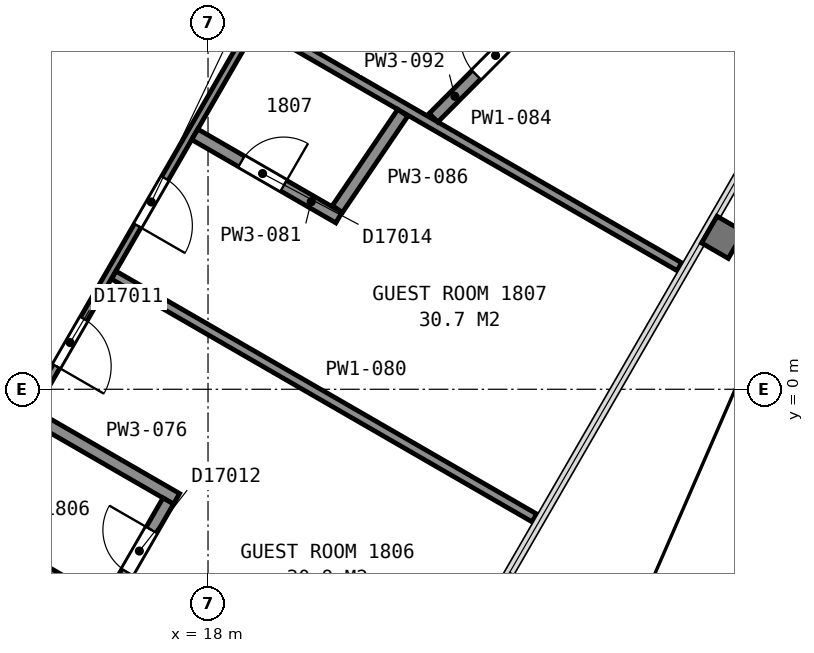
"""IFC4 building model, lengths in metres.
Left out: names, types, materials, properties, quantities, classifications, styles, units other than length and angle.
Written with IfcOpenShell. Run it as: python <this file> out.ifc"""

import sys

from ifc_helpers import new_model, si_unit, direction, frame, frame_2d, origin, place, context, subcontext, project, spatial, rectangle, extrude, element, fill, save


model = new_model("IFC4")
c1 = context("Model", 3, precision=1e-05, world=origin(), true_north=direction((0.0, 1.0)))
c2 = subcontext(c1, "Body", "Model", "MODEL_VIEW")
j1 = project(units=[si_unit("LENGTHUNIT", "METRE"), si_unit("PLANEANGLEUNIT", "RADIAN")], contexts=[c1])
p1 = place(None, origin())
s1 = spatial("IfcSite", under=j1, at=p1, CompositionType="ELEMENT")
p2 = place(p1, origin())
s2 = spatial("IfcBuilding", under=s1, at=p2, CompositionType="ELEMENT")
p3 = place(p2, frame((0.0, 0.0, 80.0)))
s3 = spatial("IfcBuildingStorey", under=s2, at=p3, CompositionType="ELEMENT", Elevation=80.0)
for number, where, z_axis, x_axis in (
    (1, (6.178, 5.299, 0.0), (0.0, 0.0, 1.0), (0.866, 0.5, 0.0)),
    (2, (7.678, 2.701, 0.0), (0.0, 0.0, 1.0), (0.866, 0.5, 0.0)),
):
    element("IfcWall", number, at=place(p3, frame(where, z_axis=z_axis, x_axis=x_axis)), inside=s3, PredefinedType="PARTITIONING", context=c2, shape_type="SweptSolid", body=[
        extrude(rectangle(XDim=12.0, YDim=0.2, at=frame_2d((6.0, 0.0))), origin(), (0.0, 0.0, 1.0), 3.35),
    ])
p4 = place(p3, frame((19.456, 7.217, 0.0), z_axis=(0.0, 0.0, 1.0), x_axis=(-0.50002170027, -0.866012874765, 0.0)))
e3 = element("IfcWall", 3, at=p4, inside=s3, PredefinedType="PARTITIONING", context=c2, shape_type="SweptSolid", body=[
    extrude(rectangle(XDim=31.379, YDim=0.125, at=frame_2d((15.69, 0.0))), origin(), (0.0, 0.0, 1.0), 2.613),
])
p5 = place(p4, frame((26.843, 0.0, 0.0)))
e4 = element("IfcOpeningElement", 4, at=p5, cuts=e3, PredefinedType="OPENING", context=c2, shape_type="SweptSolid", body=[
    extrude(rectangle(XDim=1.0, YDim=2.1, at=frame_2d((0.5, 1.05))), frame((0.0, 0.073, 0.0), z_axis=(0.0, -1.0, 0.0), x_axis=(1.0, 0.0, 0.0)), (0.0, 0.0, 1.0), 0.145),
])
p6 = place(p4, frame((24.03, 0.0, 0.0)))
e5 = element("IfcOpeningElement", 5, at=p6, cuts=e3, PredefinedType="OPENING", context=c2, shape_type="SweptSolid", body=[
    extrude(rectangle(XDim=0.9, YDim=2.1, at=frame_2d((0.45, 1.05))), frame((0.0, 0.073, 0.0), z_axis=(0.0, -1.0, 0.0), x_axis=(1.0, 0.0, 0.0)), (0.0, 0.0, 1.0), 0.145),
])
p7 = place(p4, frame((17.159, 0.0, 0.0)))
e6 = element("IfcOpeningElement", 6, at=p7, cuts=e3, PredefinedType="OPENING", context=c2, shape_type="SweptSolid", body=[
    extrude(rectangle(XDim=0.9, YDim=2.1, at=frame_2d((0.45, 1.05))), frame((0.0, 0.073, 0.0), z_axis=(0.0, -1.0, 0.0), x_axis=(1.0, 0.0, 0.0)), (0.0, 0.0, 1.0), 0.145),
])
p8 = place(p4, frame((14.24, 0.0, 0.0)))
e7 = element("IfcOpeningElement", 7, at=p8, cuts=e3, PredefinedType="OPENING", context=c2, shape_type="SweptSolid", body=[
    extrude(rectangle(XDim=0.9, YDim=2.1, at=frame_2d((0.45, 1.05))), frame((0.0, 0.073, 0.0), z_axis=(0.0, -1.0, 0.0), x_axis=(1.0, 0.0, 0.0)), (0.0, 0.0, 1.0), 0.145),
])
p9 = place(p4, frame((6.997, 0.0, 0.0)))
e8 = element("IfcOpeningElement", 8, at=p9, cuts=e3, PredefinedType="OPENING", context=c2, shape_type="SweptSolid", body=[
    extrude(rectangle(XDim=0.9, YDim=2.1, at=frame_2d((0.45, 1.05))), frame((0.0, 0.073, 0.0), z_axis=(0.0, -1.0, 0.0), x_axis=(1.0, 0.0, 0.0)), (0.0, 0.0, 1.0), 0.145),
])
p10 = place(p4, frame((4.327, 0.0, 0.0)))
e9 = element("IfcOpeningElement", 9, at=p10, cuts=e3, PredefinedType="OPENING", context=c2, shape_type="SweptSolid", body=[
    extrude(rectangle(XDim=0.9, YDim=2.1, at=frame_2d((0.45, 1.05))), frame((0.0, 0.073, 0.0), z_axis=(0.0, -1.0, 0.0), x_axis=(1.0, 0.0, 0.0)), (0.0, 0.0, 1.0), 0.145),
])
p11 = place(p3, frame((14.065, -2.254, 0.0), z_axis=(0.0, 0.0, 1.0), x_axis=(0.866045096311, -0.499965889992, 0.0)))
e10 = element("IfcWall", 10, at=p11, inside=s3, PredefinedType="PARTITIONING", context=c2, shape_type="SweptSolid", body=[
    extrude(rectangle(XDim=7.987, YDim=0.15, at=frame_2d((3.993, 0.0))), origin(), (0.0, 0.0, 1.0), 2.613),
])
p12 = place(p3, frame((15.115, -0.435, 0.0), z_axis=(0.0, 0.0, 1.0), x_axis=(0.866102295869, -0.499866795347, 0.0)))
e11 = element("IfcWall", 11, at=p12, inside=s3, PredefinedType="PARTITIONING", context=c2, shape_type="SweptSolid", body=[
    extrude(rectangle(XDim=2.733, YDim=0.2, at=frame_2d((1.367, 0.0))), origin(), (0.0, 0.0, 1.0), 2.613),
])
p13 = place(p3, frame((16.384, -3.505, 0.0), z_axis=(0.0, 0.0, 1.0), x_axis=(0.499876134923, 0.86609690551, 0.0)))
e12 = element("IfcWall", 12, at=p13, inside=s3, PredefinedType="PARTITIONING", context=c2, shape_type="SweptSolid", body=[
    extrude(rectangle(XDim=1.925, YDim=0.2, at=frame_2d((0.963, 0.0))), origin(), (0.0, 0.0, 1.0), 2.613),
])
p14 = place(p13, frame((0.575, 0.0, 0.0)))
e13 = element("IfcOpeningElement", 13, at=p14, cuts=e12, PredefinedType="OPENING", context=c2, shape_type="SweptSolid", body=[
    extrude(rectangle(XDim=0.8, YDim=2.1, at=frame_2d((0.4, 1.05))), frame((0.0, 0.11, 0.0), z_axis=(0.0, -1.0, 0.0), x_axis=(1.0, 0.0, 0.0)), (0.0, 0.0, 1.0), 0.22),
])
p15 = place(p3, frame((16.45, 1.877, 0.0), z_axis=(0.0, 0.0, 1.0), x_axis=(0.866052736899, -0.499952654668, 0.0)))
e14 = element("IfcWall", 14, at=p15, inside=s3, PredefinedType="PARTITIONING", context=c2, shape_type="SweptSolid", body=[
    extrude(rectangle(XDim=7.987, YDim=0.15, at=frame_2d((3.994, 0.0))), origin(), (0.0, 0.0, 1.0), 2.613),
])
p16 = place(p3, frame((17.782, 4.192, 0.0), z_axis=(0.0, 0.0, 1.0), x_axis=(0.866005850709, -0.50003386539, 0.0)))
e15 = element("IfcWall", 15, at=p16, inside=s3, PredefinedType="PARTITIONING", context=c2, shape_type="SweptSolid", body=[
    extrude(rectangle(XDim=2.737, YDim=0.2, at=frame_2d((1.369, 0.0))), origin(), (0.0, 0.0, 1.0), 2.613),
])
p17 = place(p16, frame((0.887, 0.0, 0.0)))
e16 = element("IfcOpeningElement", 16, at=p17, cuts=e15, PredefinedType="OPENING", context=c2, shape_type="SweptSolid", body=[
    extrude(rectangle(XDim=0.8, YDim=2.1, at=frame_2d((0.4, 1.05))), frame((0.0, 0.11, 0.0), z_axis=(0.0, -1.0, 0.0), x_axis=(1.0, 0.0, 0.0)), (0.0, 0.0, 1.0), 0.22),
])
p18 = place(p3, frame((18.832, 6.011, 0.0), z_axis=(0.0, 0.0, 1.0), x_axis=(0.866027362729, -0.499996606993, 0.0)))
e17 = element("IfcWall", 17, at=p18, inside=s3, PredefinedType="PARTITIONING", context=c2, shape_type="SweptSolid", body=[
    extrude(rectangle(XDim=7.991, YDim=0.15, at=frame_2d((3.996, 0.0))), origin(), (0.0, 0.0, 1.0), 2.613),
])
p19 = place(p3, frame((20.128, 2.964, 0.0), z_axis=(0.0, 0.0, 1.0), x_axis=(0.561894569182, 0.827208857015, 0.0)))
e18 = element("IfcWall", 18, at=p19, inside=s3, PredefinedType="PARTITIONING", context=c2, shape_type="SweptSolid", body=[
    extrude(rectangle(XDim=1.913, YDim=0.2, at=frame_2d((0.957, 0.0))), origin(), (0.0, 0.0, 1.0), 2.613),
])
p20 = place(p3, frame((21.708, 4.466, 0.0), z_axis=(0.0, 0.0, 1.0), x_axis=(0.70578703929, 0.708424064506, 0.0)))
e19 = element("IfcWall", 19, at=p20, inside=s3, PredefinedType="PARTITIONING", context=c2, shape_type="SweptSolid", body=[
    extrude(rectangle(XDim=2.87, YDim=0.2, at=frame_2d((1.435, 0.0))), origin(), (0.0, 0.0, 1.0), 2.613),
])
p21 = place(p20, frame((0.996, 0.0, 0.0)))
e20 = element("IfcOpeningElement", 20, at=p21, cuts=e19, PredefinedType="OPENING", context=c2, shape_type="SweptSolid", body=[
    extrude(rectangle(XDim=0.9, YDim=2.1, at=frame_2d((0.45, 1.05))), frame((0.0, 0.11, 0.0), z_axis=(0.0, -1.0, 0.0), x_axis=(1.0, 0.0, 0.0)), (0.0, 0.0, 1.0), 0.22),
])
p22 = place(p9, origin())
e21 = element("IfcDoor", 21, at=p22, inside=s3, OperationType="SINGLE_SWING_RIGHT", PredefinedType="DOOR", context=c2, shape_type="SweptSolid", body=[
    extrude(rectangle(XDim=0.9, YDim=2.1, at=frame_2d((0.45, 1.05))), frame((0.0, 0.025, 0.0), z_axis=(0.0, -1.0, 0.0), x_axis=(1.0, 0.0, 0.0)), (0.0, 0.0, 1.0), 0.05),
])
fill(e8, e21)
p23 = place(p10, origin())
e22 = element("IfcDoor", 22, at=p23, inside=s3, OperationType="SINGLE_SWING_RIGHT", PredefinedType="DOOR", context=c2, shape_type="SweptSolid", body=[
    extrude(rectangle(XDim=0.9, YDim=2.1, at=frame_2d((0.45, 1.05))), frame((0.0, 0.025, 0.0), z_axis=(0.0, -1.0, 0.0), x_axis=(1.0, 0.0, 0.0)), (0.0, 0.0, 1.0), 0.05),
])
fill(e9, e22)
p24 = place(p14, origin())
e23 = element("IfcDoor", 23, at=p24, inside=s3, OperationType="SINGLE_SWING_RIGHT", PredefinedType="DOOR", context=c2, shape_type="SweptSolid", body=[
    extrude(rectangle(XDim=0.8, YDim=2.1, at=frame_2d((0.4, 1.05))), frame((0.0, 0.025, 0.0), z_axis=(0.0, -1.0, 0.0), x_axis=(1.0, 0.0, 0.0)), (0.0, 0.0, 1.0), 0.05),
])
fill(e13, e23)
p25 = place(p17, origin())
e24 = element("IfcDoor", 24, at=p25, inside=s3, OperationType="SINGLE_SWING_RIGHT", PredefinedType="DOOR", context=c2, shape_type="SweptSolid", body=[
    extrude(rectangle(XDim=0.8, YDim=2.1, at=frame_2d((0.4, 1.05))), frame((0.0, 0.025, 0.0), z_axis=(0.0, -1.0, 0.0), x_axis=(1.0, 0.0, 0.0)), (0.0, 0.0, 1.0), 0.05),
])
fill(e16, e24)
p26 = place(p21, origin())
e25 = element("IfcDoor", 25, at=p26, inside=s3, OperationType="SINGLE_SWING_RIGHT", PredefinedType="DOOR", context=c2, shape_type="SweptSolid", body=[
    extrude(rectangle(XDim=0.9, YDim=2.1, at=frame_2d((0.45, 1.05))), frame((0.0, 0.025, 0.0), z_axis=(0.0, -1.0, 0.0), x_axis=(1.0, 0.0, 0.0)), (0.0, 0.0, 1.0), 0.05),
])
fill(e20, e25)
save(model, sys.argv[1])
